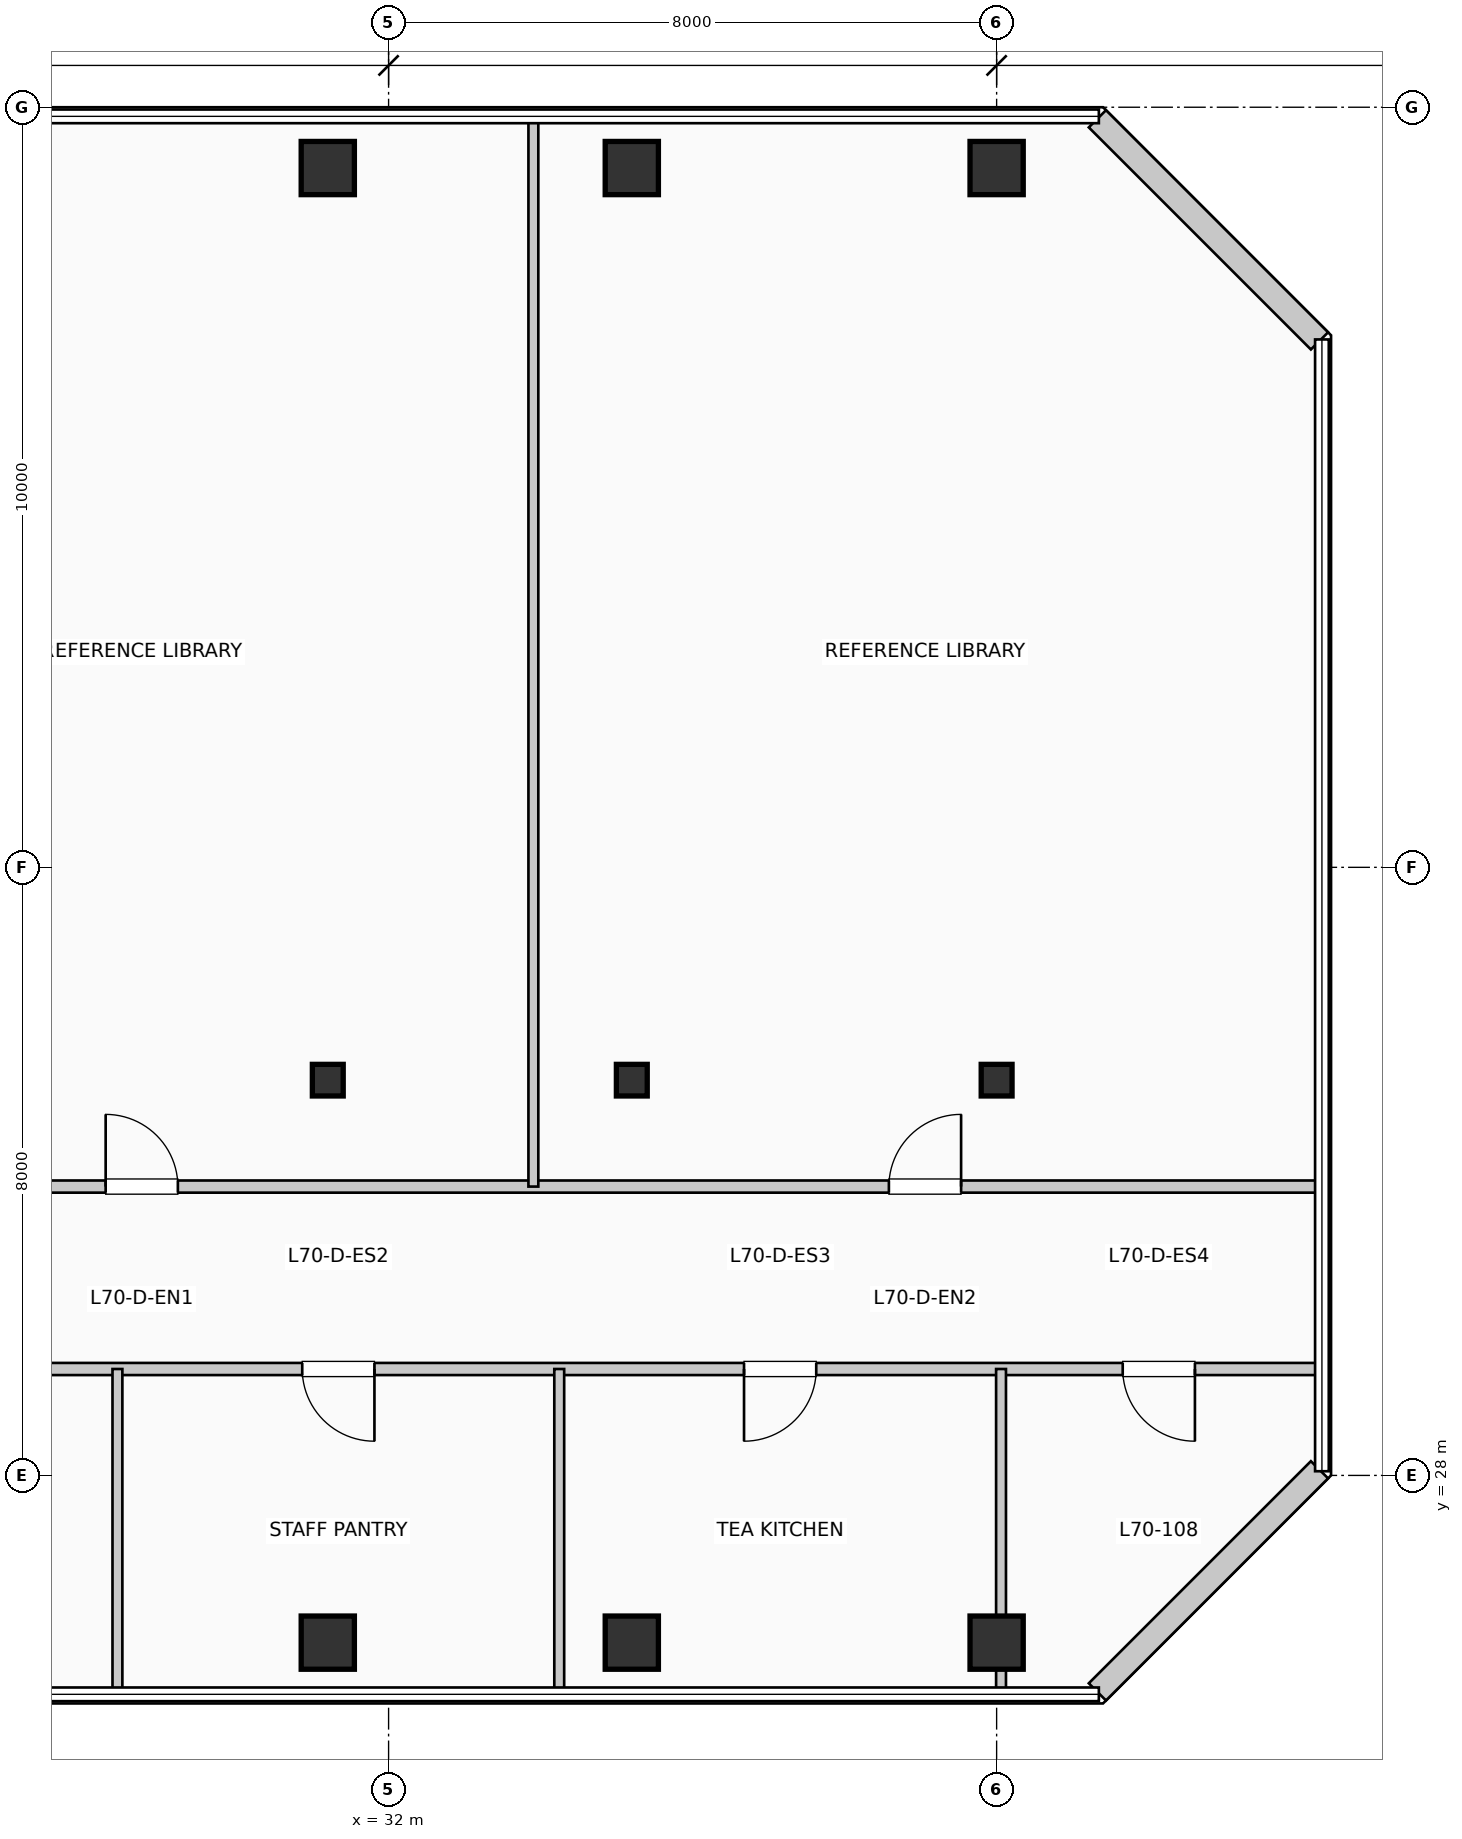
"""IFC4 building model, lengths in metres.
Left out: names, types, materials, properties, quantities, classifications, styles, units other than length and angle.
Written with IfcOpenShell. Run it as: python <this file> out.ifc"""

import sys

from ifc_helpers import new_model, si_unit, direction, frame, frame_2d, origin, origin_2d, place, context, subcontext, project, spatial, rectangle, i_section, extrude, element, fill, save


model = new_model("IFC4")
c1 = context("Model", 3, precision=1e-05, world=origin(), true_north=direction((0.0, 1.0)))
c2 = subcontext(c1, "Body", "Model", "MODEL_VIEW")
j1 = project(units=[si_unit("LENGTHUNIT", "METRE"), si_unit("PLANEANGLEUNIT", "RADIAN")], contexts=[c1])
p1 = place(None, origin())
s1 = spatial("IfcSite", under=j1, at=p1, CompositionType="ELEMENT")
p2 = place(p1, origin())
s2 = spatial("IfcBuilding", under=s1, at=p2, CompositionType="ELEMENT")
p3 = place(p2, frame((0.0, 0.0, 288.09)))
s3 = spatial("IfcBuildingStorey", under=s2, at=p3, CompositionType="ELEMENT", Elevation=288.09)
p4 = place(p3, frame((31.2, 25.8, 0.0), z_axis=(0.0, 0.0, 1.0), x_axis=(1.0, 0.0, 0.0)))
e1 = element("IfcColumn", 1, at=p4, inside=s3, PredefinedType="COLUMN", context=c2, shape_type="SweptSolid", body=[
    extrude(rectangle(XDim=0.7, YDim=0.7, at=origin_2d()), origin(), (0.0, 0.0, 1.0), 3.96),
])
p5 = place(p3, frame((31.2, 33.2, 0.0), z_axis=(0.0, 0.0, 1.0), x_axis=(1.0, 0.0, 0.0)))
e2 = element("IfcColumn", 2, at=p5, inside=s3, PredefinedType="COLUMN", context=c2, shape_type="SweptSolid", body=[
    extrude(i_section(OverallWidth=0.406, OverallDepth=0.416, WebThickness=0.022, FlangeThickness=0.036, at=origin_2d()), origin(), (0.0, 0.0, 1.0), 3.96),
])
for number, where, z_axis, x_axis in (
    (3, (31.2, 45.2, 0.0), (0.0, 0.0, 1.0), (1.0, 0.0, 0.0)),
    (4, (35.2, 25.8, 0.0), (0.0, 0.0, 1.0), (1.0, 0.0, 0.0)),
):
    element("IfcColumn", number, at=place(p3, frame(where, z_axis=z_axis, x_axis=x_axis)), inside=s3, PredefinedType="COLUMN", context=c2, shape_type="SweptSolid", body=[
        extrude(rectangle(XDim=0.7, YDim=0.7, at=origin_2d()), origin(), (0.0, 0.0, 1.0), 3.96),
    ])
p6 = place(p3, frame((35.2, 33.2, 0.0), z_axis=(0.0, 0.0, 1.0), x_axis=(1.0, 0.0, 0.0)))
e5 = element("IfcColumn", 5, at=p6, inside=s3, PredefinedType="COLUMN", context=c2, shape_type="SweptSolid", body=[
    extrude(i_section(OverallWidth=0.406, OverallDepth=0.416, WebThickness=0.022, FlangeThickness=0.036, at=origin_2d()), origin(), (0.0, 0.0, 1.0), 3.96),
])
for number, where, z_axis, x_axis in (
    (6, (35.2, 45.2, 0.0), (0.0, 0.0, 1.0), (1.0, 0.0, 0.0)),
    (7, (40.0, 25.8, 0.0), (0.0, 0.0, 1.0), (1.0, 0.0, 0.0)),
):
    element("IfcColumn", number, at=place(p3, frame(where, z_axis=z_axis, x_axis=x_axis)), inside=s3, PredefinedType="COLUMN", context=c2, shape_type="SweptSolid", body=[
        extrude(rectangle(XDim=0.7, YDim=0.7, at=origin_2d()), origin(), (0.0, 0.0, 1.0), 3.96),
    ])
p7 = place(p3, frame((40.0, 33.2, 0.0), z_axis=(0.0, 0.0, 1.0), x_axis=(1.0, 0.0, 0.0)))
e8 = element("IfcColumn", 8, at=p7, inside=s3, PredefinedType="COLUMN", context=c2, shape_type="SweptSolid", body=[
    extrude(i_section(OverallWidth=0.406, OverallDepth=0.416, WebThickness=0.022, FlangeThickness=0.036, at=origin_2d()), origin(), (0.0, 0.0, 1.0), 3.96),
])
p8 = place(p3, frame((40.0, 45.2, 0.0), z_axis=(0.0, 0.0, 1.0), x_axis=(1.0, 0.0, 0.0)))
e9 = element("IfcColumn", 9, at=p8, inside=s3, PredefinedType="COLUMN", context=c2, shape_type="SweptSolid", body=[
    extrude(rectangle(XDim=0.7, YDim=0.7, at=origin_2d()), origin(), (0.0, 0.0, 1.0), 3.96),
])
for number, where, z_axis, x_axis in (
    (10, (41.326, 25.152, 0.0), (0.0, 0.0, 1.0), (0.707, 0.707, 0.0)),
    (11, (44.248, 42.926, 0.0), (0.0, 0.0, 1.0), (-0.707, 0.707, 0.0)),
):
    element("IfcWall", number, at=place(p3, frame(where, z_axis=z_axis, x_axis=x_axis)), inside=s3, PredefinedType="SOLIDWALL", context=c2, shape_type="SweptSolid", body=[
        extrude(rectangle(XDim=4.133, YDim=0.32, at=frame_2d((2.066, 0.0))), origin(), (0.0, 0.0, 1.0), 3.74),
    ])
p9 = place(p3, frame((23.45, 29.4, 0.0), z_axis=(0.0, 0.0, 1.0), x_axis=(1.0, 0.0, 0.0)))
e12 = element("IfcWall", 12, at=p9, inside=s3, PredefinedType="PARTITIONING", context=c2, shape_type="SweptSolid", body=[
    extrude(rectangle(XDim=20.76, YDim=0.16, at=frame_2d((10.38, 0.0))), origin(), (0.0, 0.0, 1.0), 3.425),
])
p10 = place(p9, frame((2.966, 0.0, 0.0), z_axis=(0.0, 0.0, 1.0), x_axis=(-1.0, 0.0, 0.0)))
e13 = element("IfcOpeningElement", 13, at=p10, cuts=e12, PredefinedType="OPENING", context=c2, shape_type="SweptSolid", body=[
    extrude(rectangle(XDim=0.95, YDim=2.15, at=frame_2d((0.475, 1.075))), frame((0.0, 0.09, 0.0), z_axis=(0.0, -1.0, 0.0), x_axis=(1.0, 0.0, 0.0)), (0.0, 0.0, 1.0), 0.18),
])
p11 = place(p9, frame((8.364, 0.0, 0.0), z_axis=(0.0, 0.0, 1.0), x_axis=(-1.0, 0.0, 0.0)))
e14 = element("IfcOpeningElement", 14, at=p11, cuts=e12, PredefinedType="OPENING", context=c2, shape_type="SweptSolid", body=[
    extrude(rectangle(XDim=0.95, YDim=2.15, at=frame_2d((0.475, 1.075))), frame((0.0, 0.09, 0.0), z_axis=(0.0, -1.0, 0.0), x_axis=(1.0, 0.0, 0.0)), (0.0, 0.0, 1.0), 0.18),
])
p12 = place(p9, frame((14.177, 0.0, 0.0), z_axis=(0.0, 0.0, 1.0), x_axis=(-1.0, 0.0, 0.0)))
e15 = element("IfcOpeningElement", 15, at=p12, cuts=e12, PredefinedType="OPENING", context=c2, shape_type="SweptSolid", body=[
    extrude(rectangle(XDim=0.95, YDim=2.15, at=frame_2d((0.475, 1.075))), frame((0.0, 0.09, 0.0), z_axis=(0.0, -1.0, 0.0), x_axis=(1.0, 0.0, 0.0)), (0.0, 0.0, 1.0), 0.18),
])
p13 = place(p9, frame((19.159, 0.0, 0.0), z_axis=(0.0, 0.0, 1.0), x_axis=(-1.0, 0.0, 0.0)))
e16 = element("IfcOpeningElement", 16, at=p13, cuts=e12, PredefinedType="OPENING", context=c2, shape_type="SweptSolid", body=[
    extrude(rectangle(XDim=0.95, YDim=2.15, at=frame_2d((0.475, 1.075))), frame((0.0, 0.09, 0.0), z_axis=(0.0, -1.0, 0.0), x_axis=(1.0, 0.0, 0.0)), (0.0, 0.0, 1.0), 0.18),
])
p14 = place(p3, frame((23.6, 31.8, 0.0), z_axis=(0.0, 0.0, 1.0), x_axis=(1.0, 0.0, 0.0)))
e17 = element("IfcWall", 17, at=p14, inside=s3, PredefinedType="PARTITIONING", context=c2, shape_type="SweptSolid", body=[
    extrude(rectangle(XDim=20.61, YDim=0.16, at=frame_2d((10.305, 0.0))), origin(), (0.0, 0.0, 1.0), 3.74),
])
p15 = place(p14, frame((4.677, 0.0, 0.0)))
e18 = element("IfcOpeningElement", 18, at=p15, cuts=e17, PredefinedType="OPENING", context=c2, shape_type="SweptSolid", body=[
    extrude(rectangle(XDim=0.95, YDim=2.15, at=frame_2d((0.475, 1.075))), frame((0.0, 0.09, 0.0), z_axis=(0.0, -1.0, 0.0), x_axis=(1.0, 0.0, 0.0)), (0.0, 0.0, 1.0), 0.18),
])
p16 = place(p14, frame((14.982, 0.0, 0.0)))
e19 = element("IfcOpeningElement", 19, at=p16, cuts=e17, PredefinedType="OPENING", context=c2, shape_type="SweptSolid", body=[
    extrude(rectangle(XDim=0.95, YDim=2.15, at=frame_2d((0.475, 1.075))), frame((0.0, 0.09, 0.0), z_axis=(0.0, -1.0, 0.0), x_axis=(1.0, 0.0, 0.0)), (0.0, 0.0, 1.0), 0.18),
])
for number, where, z_axis, x_axis in (
    (20, (28.432, 25.19, 0.0), (0.0, 0.0, 1.0), (0.0, 1.0, 0.0)),
    (21, (34.245, 25.19, 0.0), (0.0, 0.0, 1.0), (0.0, 1.0, 0.0)),
):
    element("IfcWall", number, at=place(p3, frame(where, z_axis=z_axis, x_axis=x_axis)), inside=s3, PredefinedType="PARTITIONING", context=c2, shape_type="SweptSolid", body=[
        extrude(rectangle(XDim=4.21, YDim=0.13, at=frame_2d((2.105, 0.0))), origin(), (0.0, 0.0, 1.0), 3.74),
    ])
p17 = place(p3, frame((40.058, 25.19, 0.0), z_axis=(0.0, 0.0, 1.0), x_axis=(0.0, 1.0, 0.0)))
e22 = element("IfcWall", 22, at=p17, inside=s3, PredefinedType="PARTITIONING", context=c2, shape_type="SweptSolid", body=[
    extrude(rectangle(XDim=4.21, YDim=0.13, at=frame_2d((2.105, 0.0))), origin(), (0.0, 0.0, 1.0), 3.175),
])
p18 = place(p3, frame((33.905, 31.8, 0.0), z_axis=(0.0, 0.0, 1.0), x_axis=(0.0, 1.0, 0.0)))
e23 = element("IfcWall", 23, at=p18, inside=s3, PredefinedType="PARTITIONING", context=c2, shape_type="SweptSolid", body=[
    extrude(rectangle(XDim=14.01, YDim=0.13, at=frame_2d((7.005, 0.0))), origin(), (0.0, 0.0, 1.0), 3.74),
])
p19 = place(p11, origin())
e24 = element("IfcDoor", 24, at=p19, inside=s3, OperationType="SINGLE_SWING_RIGHT", PredefinedType="DOOR", context=c2, shape_type="SweptSolid", body=[
    extrude(rectangle(XDim=0.95, YDim=2.15, at=frame_2d((0.475, 1.075))), frame((0.0, 0.025, 0.0), z_axis=(0.0, -1.0, 0.0), x_axis=(1.0, 0.0, 0.0)), (0.0, 0.0, 1.0), 0.05),
])
fill(e14, e24)
p20 = place(p12, origin())
e25 = element("IfcDoor", 25, at=p20, inside=s3, OperationType="SINGLE_SWING_LEFT", PredefinedType="DOOR", context=c2, shape_type="SweptSolid", body=[
    extrude(rectangle(XDim=0.95, YDim=2.15, at=frame_2d((0.475, 1.075))), frame((0.0, 0.025, 0.0), z_axis=(0.0, -1.0, 0.0), x_axis=(1.0, 0.0, 0.0)), (0.0, 0.0, 1.0), 0.05),
])
fill(e15, e25)
p21 = place(p13, origin())
e26 = element("IfcDoor", 26, at=p21, inside=s3, OperationType="SINGLE_SWING_RIGHT", PredefinedType="DOOR", context=c2, shape_type="SweptSolid", body=[
    extrude(rectangle(XDim=0.95, YDim=2.15, at=frame_2d((0.475, 1.075))), frame((0.0, 0.025, 0.0), z_axis=(0.0, -1.0, 0.0), x_axis=(1.0, 0.0, 0.0)), (0.0, 0.0, 1.0), 0.05),
])
fill(e16, e26)
p22 = place(p15, origin())
e27 = element("IfcDoor", 27, at=p22, inside=s3, OperationType="SINGLE_SWING_LEFT", PredefinedType="DOOR", context=c2, shape_type="SweptSolid", body=[
    extrude(rectangle(XDim=0.95, YDim=2.15, at=frame_2d((0.475, 1.075))), frame((0.0, 0.025, 0.0), z_axis=(0.0, -1.0, 0.0), x_axis=(1.0, 0.0, 0.0)), (0.0, 0.0, 1.0), 0.05),
])
fill(e18, e27)
p23 = place(p16, origin())
e28 = element("IfcDoor", 28, at=p23, inside=s3, OperationType="SINGLE_SWING_RIGHT", PredefinedType="DOOR", context=c2, shape_type="SweptSolid", body=[
    extrude(rectangle(XDim=0.95, YDim=2.15, at=frame_2d((0.475, 1.075))), frame((0.0, 0.025, 0.0), z_axis=(0.0, -1.0, 0.0), x_axis=(1.0, 0.0, 0.0)), (0.0, 0.0, 1.0), 0.05),
])
fill(e19, e28)
save(model, sys.argv[1])
